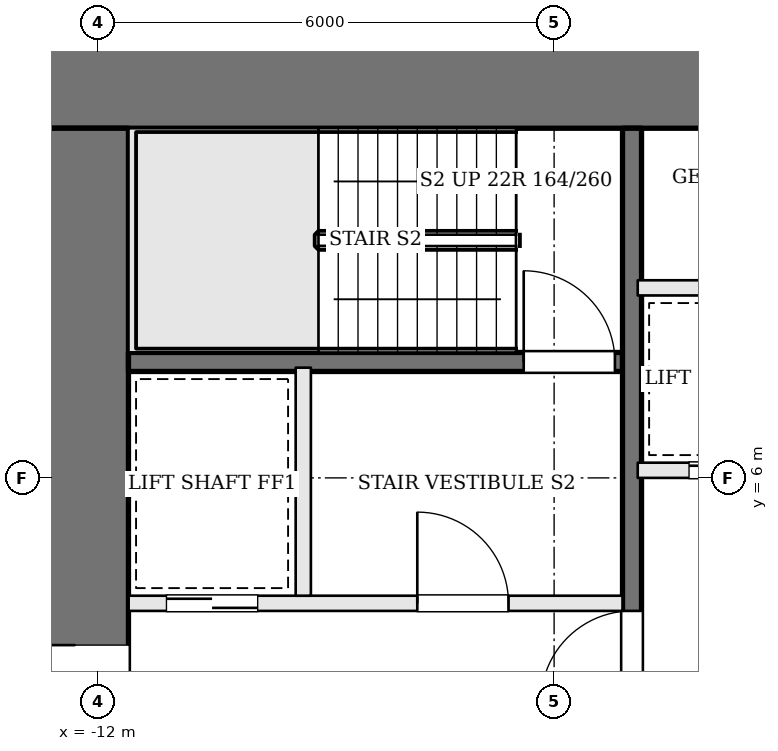
"""IFC4 building model, lengths in metres.
Left out: names, types, materials, properties, quantities, classifications, styles, units other than length and angle.
Written with IfcOpenShell. Run it as: python <this file> out.ifc"""

import sys

from ifc_helpers import new_model, si_unit, direction, frame, frame_2d, origin, place, context, subcontext, project, spatial, rectangle, extrude, element, fill, save


model = new_model("IFC4")
c1 = context("Model", 3, precision=1e-05, world=origin(), true_north=direction((0.0, 1.0)))
c2 = subcontext(c1, "Body", "Model", "MODEL_VIEW")
j1 = project(units=[si_unit("LENGTHUNIT", "METRE"), si_unit("PLANEANGLEUNIT", "RADIAN")], contexts=[c1])
p1 = place(None, origin())
s1 = spatial("IfcSite", under=j1, at=p1, CompositionType="ELEMENT")
p2 = place(p1, origin())
s2 = spatial("IfcBuilding", under=s1, at=p2, CompositionType="ELEMENT")
p3 = place(p2, frame((0.0, 0.0, 69.9)))
s3 = spatial("IfcBuildingStorey", under=s2, at=p3, CompositionType="ELEMENT", Elevation=69.9)
p4 = place(p3, frame((-13.0, 11.3, 0.0), z_axis=(0.0, 0.0, 1.0), x_axis=(1.0, 0.0, 0.0)))
e1 = element("IfcWall", 1, at=p4, inside=s3, PredefinedType="SHEAR", context=c2, shape_type="SweptSolid", body=[
    extrude(rectangle(XDim=26.0, YDim=1.4, at=frame_2d((13.0, 0.0))), origin(), (0.0, 0.0, 1.0), 3.6),
])
p5 = place(p4, frame((9.225, 0.0, 0.0)))
e2 = element("IfcOpeningElement", 2, at=p5, cuts=e1, PredefinedType="OPENING", context=c2, shape_type="SweptSolid", body=[
    extrude(rectangle(XDim=1.0, YDim=2.1, at=frame_2d((0.5, 1.05))), frame((0.0, 0.71, 0.0), z_axis=(0.0, -1.0, 0.0), x_axis=(1.0, 0.0, 0.0)), (0.0, 0.0, 1.0), 1.42),
])
p6 = place(p4, frame((11.825, 0.0, 0.0)))
e3 = element("IfcOpeningElement", 3, at=p6, cuts=e1, PredefinedType="OPENING", context=c2, shape_type="SweptSolid", body=[
    extrude(rectangle(XDim=0.7, YDim=2.1, at=frame_2d((0.35, 1.05))), frame((0.0, 0.71, 0.0), z_axis=(0.0, -1.0, 0.0), x_axis=(1.0, 0.0, 0.0)), (0.0, 0.0, 1.0), 1.42),
])
p7 = place(p4, frame((13.725, 0.0, 0.0)))
e4 = element("IfcOpeningElement", 4, at=p7, cuts=e1, PredefinedType="OPENING", context=c2, shape_type="SweptSolid", body=[
    extrude(rectangle(XDim=1.0, YDim=2.1, at=frame_2d((0.5, 1.05))), frame((0.0, 0.71, 0.0), z_axis=(0.0, -1.0, 0.0), x_axis=(1.0, 0.0, 0.0)), (0.0, 0.0, 1.0), 1.42),
])
p8 = place(p4, frame((16.225, 0.0, 0.0)))
e5 = element("IfcOpeningElement", 5, at=p8, cuts=e1, PredefinedType="OPENING", context=c2, shape_type="SweptSolid", body=[
    extrude(rectangle(XDim=0.9, YDim=2.1, at=frame_2d((0.45, 1.05))), frame((0.0, 0.71, 0.0), z_axis=(0.0, -1.0, 0.0), x_axis=(1.0, 0.0, 0.0)), (0.0, 0.0, 1.0), 1.42),
])
p9 = place(p3, frame((-12.3, -1.6, 0.0), z_axis=(0.0, 0.0, 1.0), x_axis=(0.0, 1.0, 0.0)))
e6 = element("IfcWall", 6, at=p9, inside=s3, PredefinedType="SHEAR", context=c2, shape_type="SweptSolid", body=[
    extrude(rectangle(XDim=12.2, YDim=1.4, at=frame_2d((6.1, 0.0))), origin(), (0.0, 0.0, 1.0), 3.6),
])
p10 = place(p9, frame((3.6, 0.0, 0.0)))
e7 = element("IfcOpeningElement", 7, at=p10, cuts=e6, PredefinedType="OPENING", context=c2, shape_type="SweptSolid", body=[
    extrude(rectangle(XDim=1.8, YDim=2.1, at=frame_2d((0.9, 1.05))), frame((0.0, 0.71, 0.0), z_axis=(0.0, -1.0, 0.0), x_axis=(1.0, 0.0, 0.0)), (0.0, 0.0, 1.0), 1.42),
])
p11 = place(p3, frame((-11.6, 4.35, 0.0), z_axis=(0.0, 0.0, 1.0), x_axis=(1.0, 0.0, 0.0)))
e8 = element("IfcWall", 8, at=p11, inside=s3, PredefinedType="SOLIDWALL", context=c2, shape_type="SweptSolid", body=[
    extrude(rectangle(XDim=6.5, YDim=0.2, at=frame_2d((3.25, 0.0))), origin(), (0.0, 0.0, 1.0), 3.4),
])
p12 = place(p11, frame((3.8, 0.0, 0.0)))
e9 = element("IfcOpeningElement", 9, at=p12, cuts=e8, PredefinedType="OPENING", context=c2, shape_type="SweptSolid", body=[
    extrude(rectangle(XDim=1.2, YDim=2.1, at=frame_2d((0.6, 1.05))), frame((0.0, 0.11, 0.0), z_axis=(0.0, -1.0, 0.0), x_axis=(1.0, 0.0, 0.0)), (0.0, 0.0, 1.0), 0.22),
])
p13 = place(p11, frame((0.5, 0.0, 0.0)))
e10 = element("IfcOpeningElement", 10, at=p13, cuts=e8, PredefinedType="OPENING", context=c2, shape_type="SweptSolid", body=[
    extrude(rectangle(XDim=1.2, YDim=2.1, at=frame_2d((0.6, 1.05))), frame((0.0, 0.11, 0.0), z_axis=(0.0, -1.0, 0.0), x_axis=(1.0, 0.0, 0.0)), (0.0, 0.0, 1.0), 0.22),
])
p14 = place(p3, frame((-11.6, 7.525, 0.0), z_axis=(0.0, 0.0, 1.0), x_axis=(1.0, 0.0, 0.0)))
e11 = element("IfcWall", 11, at=p14, inside=s3, PredefinedType="SOLIDWALL", context=c2, shape_type="SweptSolid", body=[
    extrude(rectangle(XDim=6.5, YDim=0.25, at=frame_2d((3.25, 0.0))), origin(), (0.0, 0.0, 1.0), 3.4),
])
p15 = place(p14, frame((5.2, 0.0, 0.0)))
e12 = element("IfcOpeningElement", 12, at=p15, cuts=e11, PredefinedType="OPENING", context=c2, shape_type="SweptSolid", body=[
    extrude(rectangle(XDim=1.2, YDim=2.1, at=frame_2d((0.6, 1.05))), frame((0.0, 0.135, 0.0), z_axis=(0.0, -1.0, 0.0), x_axis=(1.0, 0.0, 0.0)), (0.0, 0.0, 1.0), 0.27),
])
p16 = place(p3, frame((-9.3, 4.45, 0.0), z_axis=(0.0, 0.0, 1.0), x_axis=(0.0, 1.0, 0.0)))
e13 = element("IfcWall", 13, at=p16, inside=s3, PredefinedType="SOLIDWALL", context=c2, shape_type="SweptSolid", body=[
    extrude(rectangle(XDim=3.0, YDim=0.2, at=frame_2d((1.5, 0.0))), origin(), (0.0, 0.0, 1.0), 3.4),
])
p17 = place(p3, frame((-4.975, -1.6, 0.0), z_axis=(0.0, 0.0, 1.0), x_axis=(0.0, 1.0, 0.0)))
e14 = element("IfcWall", 14, at=p17, inside=s3, PredefinedType="SOLIDWALL", context=c2, shape_type="SweptSolid", body=[
    extrude(rectangle(XDim=12.2, YDim=0.25, at=frame_2d((6.1, 0.0))), origin(), (0.0, 0.0, 1.0), 3.4),
])
p18 = place(p17, frame((4.65, 0.0, 0.0)))
e15 = element("IfcOpeningElement", 15, at=p18, cuts=e14, PredefinedType="OPENING", context=c2, shape_type="SweptSolid", body=[
    extrude(rectangle(XDim=1.2, YDim=2.1, at=frame_2d((0.6, 1.05))), frame((0.0, 0.135, 0.0), z_axis=(0.0, -1.0, 0.0), x_axis=(1.0, 0.0, 0.0)), (0.0, 0.0, 1.0), 0.27),
])
p19 = place(p3, frame((-4.9, 6.1, 0.0), z_axis=(0.0, 0.0, 1.0), x_axis=(1.0, 0.0, 0.0)))
e16 = element("IfcWall", 16, at=p19, inside=s3, PredefinedType="SOLIDWALL", context=c2, shape_type="SweptSolid", body=[
    extrude(rectangle(XDim=9.8, YDim=0.2, at=frame_2d((4.9, 0.0))), origin(), (0.0, 0.0, 1.0), 3.4),
])
p20 = place(p19, frame((0.675, 0.0, 0.0)))
e17 = element("IfcOpeningElement", 17, at=p20, cuts=e16, PredefinedType="OPENING", context=c2, shape_type="SweptSolid", body=[
    extrude(rectangle(XDim=1.1, YDim=2.1, at=frame_2d((0.55, 1.05))), frame((0.0, 0.11, 0.0), z_axis=(0.0, -1.0, 0.0), x_axis=(1.0, 0.0, 0.0)), (0.0, 0.0, 1.0), 0.22),
])
p21 = place(p19, frame((3.125, 0.0, 0.0)))
e18 = element("IfcOpeningElement", 18, at=p21, cuts=e16, PredefinedType="OPENING", context=c2, shape_type="SweptSolid", body=[
    extrude(rectangle(XDim=1.1, YDim=2.1, at=frame_2d((0.55, 1.05))), frame((0.0, 0.11, 0.0), z_axis=(0.0, -1.0, 0.0), x_axis=(1.0, 0.0, 0.0)), (0.0, 0.0, 1.0), 0.22),
])
p22 = place(p19, frame((5.575, 0.0, 0.0)))
e19 = element("IfcOpeningElement", 19, at=p22, cuts=e16, PredefinedType="OPENING", context=c2, shape_type="SweptSolid", body=[
    extrude(rectangle(XDim=1.1, YDim=2.1, at=frame_2d((0.55, 1.05))), frame((0.0, 0.11, 0.0), z_axis=(0.0, -1.0, 0.0), x_axis=(1.0, 0.0, 0.0)), (0.0, 0.0, 1.0), 0.22),
])
p23 = place(p19, frame((8.025, 0.0, 0.0)))
e20 = element("IfcOpeningElement", 20, at=p23, cuts=e16, PredefinedType="OPENING", context=c2, shape_type="SweptSolid", body=[
    extrude(rectangle(XDim=1.1, YDim=2.1, at=frame_2d((0.55, 1.05))), frame((0.0, 0.11, 0.0), z_axis=(0.0, -1.0, 0.0), x_axis=(1.0, 0.0, 0.0)), (0.0, 0.0, 1.0), 0.22),
])
p24 = place(p3, frame((-4.9, 8.5, 0.0), z_axis=(0.0, 0.0, 1.0), x_axis=(1.0, 0.0, 0.0)))
e21 = element("IfcWall", 21, at=p24, inside=s3, PredefinedType="SOLIDWALL", context=c2, shape_type="SweptSolid", body=[
    extrude(rectangle(XDim=9.8, YDim=0.2, at=frame_2d((4.9, 0.0))), origin(), (0.0, 0.0, 1.0), 3.4),
])
p25 = place(p10, origin())
e22 = element("IfcDoor", 22, at=p25, inside=s3, OperationType="DOUBLE_DOOR_SINGLE_SWING", PredefinedType="DOOR", context=c2, shape_type="SweptSolid", body=[
    extrude(rectangle(XDim=1.8, YDim=2.1, at=frame_2d((0.9, 1.05))), frame((0.0, 0.025, 0.0), z_axis=(0.0, -1.0, 0.0), x_axis=(1.0, 0.0, 0.0)), (0.0, 0.0, 1.0), 0.05),
])
fill(e7, e22)
p26 = place(p18, origin())
e23 = element("IfcDoor", 23, at=p26, inside=s3, OperationType="SINGLE_SWING_LEFT", PredefinedType="DOOR", context=c2, shape_type="SweptSolid", body=[
    extrude(rectangle(XDim=1.2, YDim=2.1, at=frame_2d((0.6, 1.05))), frame((0.0, 0.025, 0.0), z_axis=(0.0, -1.0, 0.0), x_axis=(1.0, 0.0, 0.0)), (0.0, 0.0, 1.0), 0.05),
])
fill(e15, e23)
p27 = place(p12, origin())
e24 = element("IfcDoor", 24, at=p27, inside=s3, OperationType="SINGLE_SWING_LEFT", PredefinedType="DOOR", context=c2, shape_type="SweptSolid", body=[
    extrude(rectangle(XDim=1.2, YDim=2.1, at=frame_2d((0.6, 1.05))), frame((0.0, 0.025, 0.0), z_axis=(0.0, -1.0, 0.0), x_axis=(1.0, 0.0, 0.0)), (0.0, 0.0, 1.0), 0.05),
])
fill(e9, e24)
p28 = place(p15, origin())
e25 = element("IfcDoor", 25, at=p28, inside=s3, OperationType="SINGLE_SWING_LEFT", PredefinedType="DOOR", context=c2, shape_type="SweptSolid", body=[
    extrude(rectangle(XDim=1.2, YDim=2.1, at=frame_2d((0.6, 1.05))), frame((0.0, 0.025, 0.0), z_axis=(0.0, -1.0, 0.0), x_axis=(1.0, 0.0, 0.0)), (0.0, 0.0, 1.0), 0.05),
])
fill(e12, e25)
p29 = place(p13, origin())
e26 = element("IfcDoor", 26, at=p29, inside=s3, OperationType="SLIDING_TO_RIGHT", PredefinedType="DOOR", context=c2, shape_type="SweptSolid", body=[
    extrude(rectangle(XDim=1.2, YDim=2.1, at=frame_2d((0.6, 1.05))), frame((0.0, 0.025, 0.0), z_axis=(0.0, -1.0, 0.0), x_axis=(1.0, 0.0, 0.0)), (0.0, 0.0, 1.0), 0.05),
])
fill(e10, e26)
p30 = place(p20, origin())
e27 = element("IfcDoor", 27, at=p30, inside=s3, OperationType="SLIDING_TO_RIGHT", PredefinedType="DOOR", context=c2, shape_type="SweptSolid", body=[
    extrude(rectangle(XDim=1.1, YDim=2.1, at=frame_2d((0.55, 1.05))), frame((0.0, 0.025, 0.0), z_axis=(0.0, -1.0, 0.0), x_axis=(1.0, 0.0, 0.0)), (0.0, 0.0, 1.0), 0.05),
])
fill(e17, e27)
save(model, sys.argv[1])
